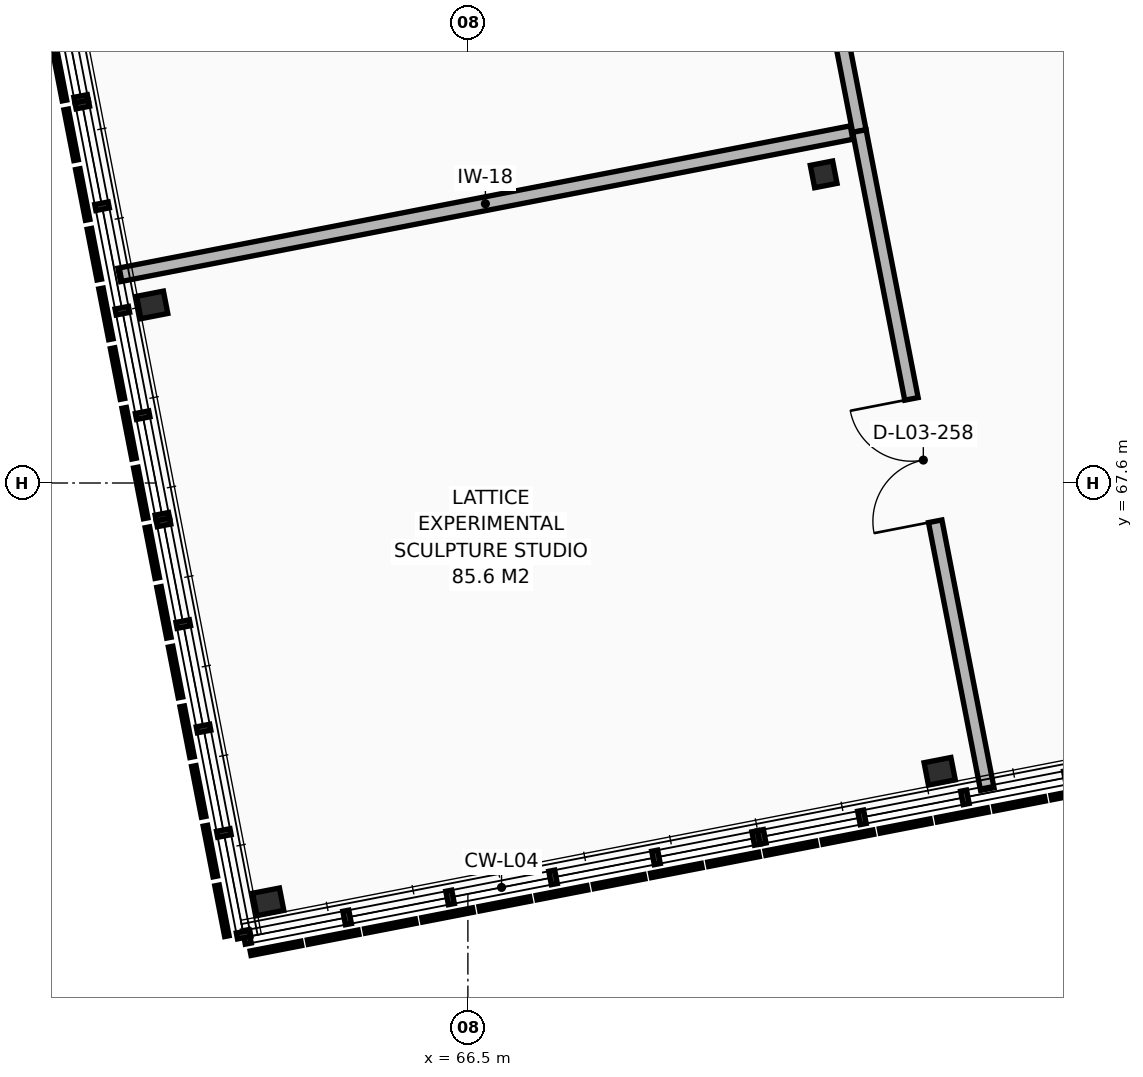
"""IFC4 building model, lengths in metres.
Left out: names, types, materials, properties, quantities, classifications, styles, units other than length and angle.
Written with IfcOpenShell. Run it as: python <this file> out.ifc"""

import sys

from ifc_helpers import new_model, si_unit, direction, frame, frame_2d, origin, origin_2d, place, context, subcontext, project, spatial, rectangle, i_section, extrude, element, fill, save


model = new_model("IFC4")
c1 = context("Model", 3, precision=1e-05, world=origin(), true_north=direction((0.0, 1.0)))
c2 = subcontext(c1, "Body", "Model", "MODEL_VIEW")
j1 = project(units=[si_unit("LENGTHUNIT", "METRE"), si_unit("PLANEANGLEUNIT", "RADIAN")], contexts=[c1])
p1 = place(None, origin())
s1 = spatial("IfcSite", under=j1, at=p1, CompositionType="ELEMENT")
p2 = place(p1, origin())
s2 = spatial("IfcBuilding", under=s1, at=p2, CompositionType="ELEMENT")
p3 = place(p2, frame((0.0, 0.0, 13.68)))
s3 = spatial("IfcBuildingStorey", under=s2, at=p3, CompositionType="ELEMENT", Elevation=13.68)
for number, where, z_axis, x_axis in (
    (1, (63.873, 62.09, 0.0), (0.0, 0.0, 1.0), (0.982, 0.191, 0.0)),
    (2, (62.346, 69.943, 0.0), (0.0, 0.0, 1.0), (0.982, 0.191, 0.0)),
    (3, (72.707, 63.807, 0.0), (0.0, 0.0, 1.0), (0.982, 0.191, 0.0)),
):
    element("IfcColumn", number, at=place(p3, frame(where, z_axis=z_axis, x_axis=x_axis)), inside=s3, PredefinedType="COLUMN", context=c2, shape_type="SweptSolid", body=[
        extrude(i_section(OverallWidth=0.3, OverallDepth=0.36, WebThickness=0.012, FlangeThickness=0.022, FilletRadius=0.027, at=origin_2d()), origin(), (0.0, 0.0, 1.0), 3.96),
    ])
p4 = place(p3, frame((71.181, 71.66, 0.0), z_axis=(0.0, 0.0, 1.0), x_axis=(0.981627183448, 0.190808995377, 0.0)))
e4 = element("IfcColumn", 4, at=p4, inside=s3, PredefinedType="COLUMN", context=c2, shape_type="SweptSolid", body=[
    extrude(i_section(OverallWidth=0.3, OverallDepth=0.3, WebThickness=0.011, FlangeThickness=0.019, FilletRadius=0.027, at=origin_2d()), origin(), (0.0, 0.0, 1.0), 3.96),
])
p5 = place(p3, frame((71.651, 72.23, 0.0), z_axis=(0.0, 0.0, 1.0), x_axis=(-0.190786732806, 0.981631510591, 0.0)))
e5 = element("IfcWall", 5, at=p5, inside=s3, PredefinedType="PARTITIONING", context=c2, shape_type="SweptSolid", body=[
    extrude(rectangle(XDim=7.88, YDim=0.18, at=frame_2d((3.94, 0.0))), origin(), (0.0, 0.0, 1.0), 3.35),
])
p6 = place(p5, frame((3.23, 0.0, 0.0)))
e6 = element("IfcOpeningElement", 6, at=p6, cuts=e5, PredefinedType="OPENING", context=c2, shape_type="SweptSolid", body=[
    extrude(rectangle(XDim=1.42, YDim=2.18, at=frame_2d((0.71, 1.09))), frame((0.0, 0.1, 0.0), z_axis=(0.0, -1.0, 0.0), x_axis=(1.0, 0.0, 0.0)), (0.0, 0.0, 1.0), 0.2),
])
p7 = place(p3, frame((73.333, 63.573, 0.0), z_axis=(0.0, 0.0, 1.0), x_axis=(-0.190805940679, 0.981627777216, 0.0)))
e7 = element("IfcWall", 7, at=p7, inside=s3, PredefinedType="PARTITIONING", context=c2, shape_type="SweptSolid", body=[
    extrude(rectangle(XDim=8.82, YDim=0.18, at=frame_2d((4.41, 0.0))), origin(), (0.0, 0.0, 1.0), 3.3),
])
p8 = place(p7, frame((3.59, 0.0, 0.0)))
e8 = element("IfcOpeningElement", 8, at=p8, cuts=e7, PredefinedType="OPENING", context=c2, shape_type="SweptSolid", body=[
    extrude(rectangle(XDim=1.64, YDim=2.2, at=frame_2d((0.82, 1.1))), frame((0.0, 0.1, 0.0), z_axis=(0.0, -1.0, 0.0), x_axis=(1.0, 0.0, 0.0)), (0.0, 0.0, 1.0), 0.2),
])
p9 = place(p3, frame((71.548, 72.21, 0.0), z_axis=(0.0, 0.0, 1.0), x_axis=(-0.981627297685, -0.190808407676, 0.0)))
e9 = element("IfcWall", 9, at=p9, inside=s3, PredefinedType="PARTITIONING", context=c2, shape_type="SweptSolid", body=[
    extrude(rectangle(XDim=9.815, YDim=0.18, at=frame_2d((4.908, 0.0))), origin(), (0.0, 0.0, 1.0), 3.35),
])
p10 = place(p8, origin())
e10 = element("IfcDoor", 10, at=p10, inside=s3, OperationType="DOUBLE_DOOR_SINGLE_SWING", PredefinedType="DOOR", context=c2, shape_type="SweptSolid", body=[
    extrude(rectangle(XDim=1.64, YDim=2.2, at=frame_2d((0.82, 1.1))), frame((0.0, 0.025, 0.0), z_axis=(0.0, -1.0, 0.0), x_axis=(1.0, 0.0, 0.0)), (0.0, 0.0, 1.0), 0.05),
])
fill(e8, e10)
save(model, sys.argv[1])
